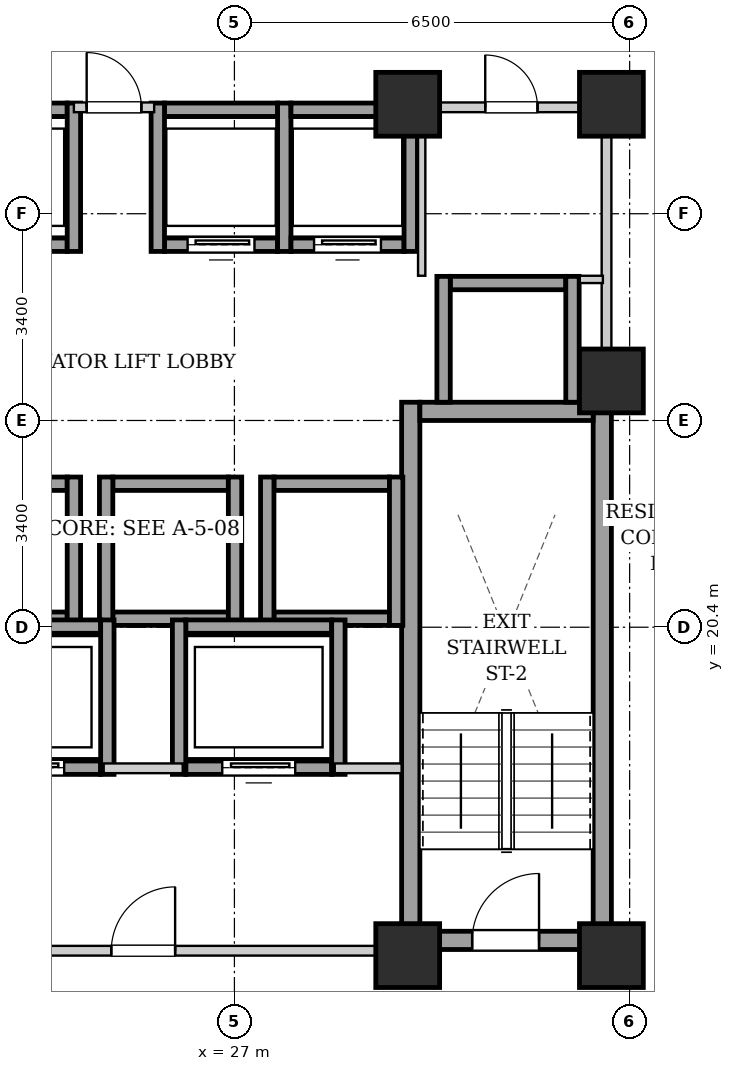
"""IFC4 building model, lengths in metres.
Left out: names, types, materials, properties, quantities, classifications, styles, units other than length and angle.
Written with IfcOpenShell. Run it as: python <this file> out.ifc"""

import sys

from ifc_helpers import new_model, si_unit, direction, frame, frame_2d, origin, origin_2d, place, context, subcontext, project, spatial, rectangle, extrude, element, fill, save


model = new_model("IFC4")
c1 = context("Model", 3, precision=1e-05, world=origin(), true_north=direction((0.0, 1.0)))
c2 = subcontext(c1, "Body", "Model", "MODEL_VIEW")
j1 = project(units=[si_unit("LENGTHUNIT", "METRE"), si_unit("PLANEANGLEUNIT", "RADIAN")], contexts=[c1])
p1 = place(None, origin())
s1 = spatial("IfcSite", under=j1, at=p1, CompositionType="ELEMENT")
p2 = place(p1, origin())
s2 = spatial("IfcBuilding", under=s1, at=p2, CompositionType="ELEMENT")
p3 = place(p2, frame((0.0, 0.0, 87.9)))
s3 = spatial("IfcBuildingStorey", under=s2, at=p3, CompositionType="ELEMENT", Elevation=87.9)
for number, where, z_axis, x_axis in (
    (1, (29.85, 15.0, 0.0), (0.0, 0.0, 1.0), (1.0, 0.0, 0.0)),
    (2, (33.2, 15.0, 0.0), (0.0, 0.0, 1.0), (1.0, 0.0, 0.0)),
    (3, (29.85, 29.0, 0.0), (0.0, 0.0, 1.0), (1.0, 0.0, 0.0)),
    (4, (33.2, 29.0, 0.0), (0.0, 0.0, 1.0), (1.0, 0.0, 0.0)),
    (5, (33.2, 24.45, 0.0), (0.0, 0.0, 1.0), (1.0, 0.0, 0.0)),
):
    element("IfcColumn", number, at=place(p3, frame(where, z_axis=z_axis, x_axis=x_axis)), inside=s3, PredefinedType="COLUMN", context=c2, shape_type="SweptSolid", body=[
        extrude(rectangle(XDim=1.05, YDim=1.05, at=origin_2d()), origin(), (0.0, 0.0, 1.0), 3.2),
    ])
for number, where, z_axis, x_axis in (
    (6, (29.9, 15.1, 0.0), (0.0, 0.0, 1.0), (0.0, 1.0, 0.0)),
    (7, (33.05, 15.1, 0.0), (0.0, 0.0, 1.0), (0.0, 1.0, 0.0)),
):
    element("IfcWall", number, at=place(p3, frame(where, z_axis=z_axis, x_axis=x_axis)), inside=s3, PredefinedType="SHEAR", context=c2, shape_type="SweptSolid", body=[
        extrude(rectangle(XDim=9.0, YDim=0.3, at=frame_2d((4.5, 0.0))), origin(), (0.0, 0.0, 1.0), 2.94),
    ])
p4 = place(p3, frame((30.05, 23.95, 0.0), z_axis=(0.0, 0.0, 1.0), x_axis=(1.0, 0.0, 0.0)))
e8 = element("IfcWall", 8, at=p4, inside=s3, PredefinedType="SHEAR", context=c2, shape_type="SweptSolid", body=[
    extrude(rectangle(XDim=2.85, YDim=0.3, at=frame_2d((1.425, 0.0))), origin(), (0.0, 0.0, 1.0), 2.94),
])
p5 = place(p3, frame((30.05, 15.25, 0.0), z_axis=(0.0, 0.0, 1.0), x_axis=(1.0, 0.0, 0.0)))
e9 = element("IfcWall", 9, at=p5, inside=s3, PredefinedType="SHEAR", context=c2, shape_type="SweptSolid", body=[
    extrude(rectangle(XDim=2.85, YDim=0.3, at=frame_2d((1.425, 0.0))), origin(), (0.0, 0.0, 1.0), 2.94),
])
p6 = place(p5, frame((0.86, 0.0, 0.0)))
e10 = element("IfcOpeningElement", 10, at=p6, cuts=e9, PredefinedType="OPENING", context=c2, shape_type="SweptSolid", body=[
    extrude(rectangle(XDim=1.1, YDim=2.05, at=frame_2d((0.55, 1.025))), frame((0.0, 0.16, 0.0), z_axis=(0.0, -1.0, 0.0), x_axis=(1.0, 0.0, 0.0)), (0.0, 0.0, 1.0), 0.32),
])
p7 = place(p3, frame((22.35, 26.69, 0.0), z_axis=(0.0, 0.0, 1.0), x_axis=(1.0, 0.0, 0.0)))
e11 = element("IfcWall", 11, at=p7, inside=s3, PredefinedType="SHEAR", context=c2, shape_type="SweptSolid", body=[
    extrude(rectangle(XDim=1.9, YDim=0.22, at=frame_2d((0.95, 0.0))), origin(), (0.0, 0.0, 1.0), 2.94),
])
p8 = place(p7, frame((0.4, 0.0, 0.0)))
e12 = element("IfcOpeningElement", 12, at=p8, cuts=e11, PredefinedType="OPENING", context=c2, shape_type="SweptSolid", body=[
    extrude(rectangle(XDim=1.1, YDim=2.15, at=frame_2d((0.55, 1.075))), frame((0.0, 0.12, 0.0), z_axis=(0.0, -1.0, 0.0), x_axis=(1.0, 0.0, 0.0)), (0.0, 0.0, 1.0), 0.24),
])
p9 = place(p3, frame((22.35, 28.91, 0.0), z_axis=(0.0, 0.0, 1.0), x_axis=(1.0, 0.0, 0.0)))
e13 = element("IfcWall", 13, at=p9, inside=s3, PredefinedType="SHEAR", context=c2, shape_type="SweptSolid", body=[
    extrude(rectangle(XDim=1.9, YDim=0.22, at=frame_2d((0.95, 0.0))), origin(), (0.0, 0.0, 1.0), 2.94),
])
p10 = place(p3, frame((24.36, 26.58, 0.0), z_axis=(0.0, 0.0, 1.0), x_axis=(0.0, 1.0, 0.0)))
e14 = element("IfcWall", 14, at=p10, inside=s3, PredefinedType="SHEAR", context=c2, shape_type="SweptSolid", body=[
    extrude(rectangle(XDim=2.44, YDim=0.22, at=frame_2d((1.22, 0.0))), origin(), (0.0, 0.0, 1.0), 2.94),
])
p11 = place(p3, frame((25.85, 26.69, 0.0), z_axis=(0.0, 0.0, 1.0), x_axis=(1.0, 0.0, 0.0)))
e15 = element("IfcWall", 15, at=p11, inside=s3, PredefinedType="SHEAR", context=c2, shape_type="SweptSolid", body=[
    extrude(rectangle(XDim=1.86, YDim=0.22, at=frame_2d((0.93, 0.0))), origin(), (0.0, 0.0, 1.0), 2.94),
])
p12 = place(p11, frame((0.38, 0.0, 0.0)))
e16 = element("IfcOpeningElement", 16, at=p12, cuts=e15, PredefinedType="OPENING", context=c2, shape_type="SweptSolid", body=[
    extrude(rectangle(XDim=1.1, YDim=2.15, at=frame_2d((0.55, 1.075))), frame((0.0, 0.12, 0.0), z_axis=(0.0, -1.0, 0.0), x_axis=(1.0, 0.0, 0.0)), (0.0, 0.0, 1.0), 0.24),
])
p13 = place(p3, frame((25.85, 28.91, 0.0), z_axis=(0.0, 0.0, 1.0), x_axis=(1.0, 0.0, 0.0)))
e17 = element("IfcWall", 17, at=p13, inside=s3, PredefinedType="SHEAR", context=c2, shape_type="SweptSolid", body=[
    extrude(rectangle(XDim=1.86, YDim=0.22, at=frame_2d((0.93, 0.0))), origin(), (0.0, 0.0, 1.0), 2.94),
])
for number, where, z_axis, x_axis in (
    (18, (25.74, 26.58, 0.0), (0.0, 0.0, 1.0), (0.0, 1.0, 0.0)),
    (19, (27.82, 26.58, 0.0), (0.0, 0.0, 1.0), (0.0, 1.0, 0.0)),
):
    element("IfcWall", number, at=place(p3, frame(where, z_axis=z_axis, x_axis=x_axis)), inside=s3, PredefinedType="SHEAR", context=c2, shape_type="SweptSolid", body=[
        extrude(rectangle(XDim=2.44, YDim=0.22, at=frame_2d((1.22, 0.0))), origin(), (0.0, 0.0, 1.0), 2.94),
    ])
p14 = place(p3, frame((27.93, 26.69, 0.0), z_axis=(0.0, 0.0, 1.0), x_axis=(1.0, 0.0, 0.0)))
e20 = element("IfcWall", 20, at=p14, inside=s3, PredefinedType="SHEAR", context=c2, shape_type="SweptSolid", body=[
    extrude(rectangle(XDim=1.86, YDim=0.22, at=frame_2d((0.93, 0.0))), origin(), (0.0, 0.0, 1.0), 2.94),
])
p15 = place(p14, frame((0.38, 0.0, 0.0)))
e21 = element("IfcOpeningElement", 21, at=p15, cuts=e20, PredefinedType="OPENING", context=c2, shape_type="SweptSolid", body=[
    extrude(rectangle(XDim=1.1, YDim=2.15, at=frame_2d((0.55, 1.075))), frame((0.0, 0.12, 0.0), z_axis=(0.0, -1.0, 0.0), x_axis=(1.0, 0.0, 0.0)), (0.0, 0.0, 1.0), 0.24),
])
p16 = place(p3, frame((27.93, 28.91, 0.0), z_axis=(0.0, 0.0, 1.0), x_axis=(1.0, 0.0, 0.0)))
e22 = element("IfcWall", 22, at=p16, inside=s3, PredefinedType="SHEAR", context=c2, shape_type="SweptSolid", body=[
    extrude(rectangle(XDim=1.86, YDim=0.22, at=frame_2d((0.93, 0.0))), origin(), (0.0, 0.0, 1.0), 2.94),
])
p17 = place(p3, frame((29.9, 26.58, 0.0), z_axis=(0.0, 0.0, 1.0), x_axis=(0.0, 1.0, 0.0)))
e23 = element("IfcWall", 23, at=p17, inside=s3, PredefinedType="SHEAR", context=c2, shape_type="SweptSolid", body=[
    extrude(rectangle(XDim=2.44, YDim=0.22, at=frame_2d((1.22, 0.0))), origin(), (0.0, 0.0, 1.0), 2.94),
])
for number, where, z_axis, x_axis in (
    (24, (22.35, 20.54, 0.0), (0.0, 0.0, 1.0), (1.0, 0.0, 0.0)),
    (25, (22.35, 22.76, 0.0), (0.0, 0.0, 1.0), (1.0, 0.0, 0.0)),
):
    element("IfcWall", number, at=place(p3, frame(where, z_axis=z_axis, x_axis=x_axis)), inside=s3, PredefinedType="SHEAR", context=c2, shape_type="SweptSolid", body=[
        extrude(rectangle(XDim=1.9, YDim=0.22, at=frame_2d((0.95, 0.0))), origin(), (0.0, 0.0, 1.0), 2.94),
    ])
p18 = place(p3, frame((24.36, 20.43, 0.0), z_axis=(0.0, 0.0, 1.0), x_axis=(0.0, 1.0, 0.0)))
e26 = element("IfcWall", 26, at=p18, inside=s3, PredefinedType="SHEAR", context=c2, shape_type="SweptSolid", body=[
    extrude(rectangle(XDim=2.44, YDim=0.22, at=frame_2d((1.22, 0.0))), origin(), (0.0, 0.0, 1.0), 2.94),
])
for number, where, z_axis, x_axis in (
    (27, (25.0, 20.54, 0.0), (0.0, 0.0, 1.0), (1.0, 0.0, 0.0)),
    (28, (25.0, 22.76, 0.0), (0.0, 0.0, 1.0), (1.0, 0.0, 0.0)),
):
    element("IfcWall", number, at=place(p3, frame(where, z_axis=z_axis, x_axis=x_axis)), inside=s3, PredefinedType="SHEAR", context=c2, shape_type="SweptSolid", body=[
        extrude(rectangle(XDim=1.9, YDim=0.22, at=frame_2d((0.95, 0.0))), origin(), (0.0, 0.0, 1.0), 2.94),
    ])
for number, where, z_axis, x_axis in (
    (29, (24.89, 20.43, 0.0), (0.0, 0.0, 1.0), (0.0, 1.0, 0.0)),
    (30, (27.01, 20.43, 0.0), (0.0, 0.0, 1.0), (0.0, 1.0, 0.0)),
):
    element("IfcWall", number, at=place(p3, frame(where, z_axis=z_axis, x_axis=x_axis)), inside=s3, PredefinedType="SHEAR", context=c2, shape_type="SweptSolid", body=[
        extrude(rectangle(XDim=2.44, YDim=0.22, at=frame_2d((1.22, 0.0))), origin(), (0.0, 0.0, 1.0), 2.94),
    ])
for number, where, z_axis, x_axis in (
    (31, (27.65, 20.54, 0.0), (0.0, 0.0, 1.0), (1.0, 0.0, 0.0)),
    (32, (27.65, 22.76, 0.0), (0.0, 0.0, 1.0), (1.0, 0.0, 0.0)),
):
    element("IfcWall", number, at=place(p3, frame(where, z_axis=z_axis, x_axis=x_axis)), inside=s3, PredefinedType="SHEAR", context=c2, shape_type="SweptSolid", body=[
        extrude(rectangle(XDim=1.9, YDim=0.22, at=frame_2d((0.95, 0.0))), origin(), (0.0, 0.0, 1.0), 2.94),
    ])
for number, where, z_axis, x_axis in (
    (33, (27.54, 20.43, 0.0), (0.0, 0.0, 1.0), (0.0, 1.0, 0.0)),
    (34, (29.66, 20.43, 0.0), (0.0, 0.0, 1.0), (0.0, 1.0, 0.0)),
):
    element("IfcWall", number, at=place(p3, frame(where, z_axis=z_axis, x_axis=x_axis)), inside=s3, PredefinedType="SHEAR", context=c2, shape_type="SweptSolid", body=[
        extrude(rectangle(XDim=2.44, YDim=0.22, at=frame_2d((1.22, 0.0))), origin(), (0.0, 0.0, 1.0), 2.94),
    ])
p19 = place(p3, frame((30.55, 26.06, 0.0), z_axis=(0.0, 0.0, 1.0), x_axis=(1.0, 0.0, 0.0)))
e35 = element("IfcWall", 35, at=p19, inside=s3, PredefinedType="SHEAR", context=c2, shape_type="SweptSolid", body=[
    extrude(rectangle(XDim=1.9, YDim=0.22, at=frame_2d((0.95, 0.0))), origin(), (0.0, 0.0, 1.0), 2.94),
])
for number, where, z_axis, x_axis in (
    (36, (30.44, 24.1, 0.0), (0.0, 0.0, 1.0), (0.0, 1.0, 0.0)),
    (37, (32.56, 24.1, 0.0), (0.0, 0.0, 1.0), (0.0, 1.0, 0.0)),
):
    element("IfcWall", number, at=place(p3, frame(where, z_axis=z_axis, x_axis=x_axis)), inside=s3, PredefinedType="SHEAR", context=c2, shape_type="SweptSolid", body=[
        extrude(rectangle(XDim=2.07, YDim=0.22, at=frame_2d((1.035, 0.0))), origin(), (0.0, 0.0, 1.0), 2.94),
    ])
p20 = place(p3, frame((22.4, 18.09, 0.0), z_axis=(0.0, 0.0, 1.0), x_axis=(1.0, 0.0, 0.0)))
e38 = element("IfcWall", 38, at=p20, inside=s3, PredefinedType="SHEAR", context=c2, shape_type="SweptSolid", body=[
    extrude(rectangle(XDim=2.4, YDim=0.22, at=frame_2d((1.2, 0.0))), origin(), (0.0, 0.0, 1.0), 2.94),
])
p21 = place(p20, frame((0.6, 0.0, 0.0)))
e39 = element("IfcOpeningElement", 39, at=p21, cuts=e38, PredefinedType="OPENING", context=c2, shape_type="SweptSolid", body=[
    extrude(rectangle(XDim=1.2, YDim=2.15, at=frame_2d((0.6, 1.075))), frame((0.0, 0.12, 0.0), z_axis=(0.0, -1.0, 0.0), x_axis=(1.0, 0.0, 0.0)), (0.0, 0.0, 1.0), 0.24),
])
p22 = place(p3, frame((22.4, 20.41, 0.0), z_axis=(0.0, 0.0, 1.0), x_axis=(1.0, 0.0, 0.0)))
e40 = element("IfcWall", 40, at=p22, inside=s3, PredefinedType="SHEAR", context=c2, shape_type="SweptSolid", body=[
    extrude(rectangle(XDim=2.4, YDim=0.22, at=frame_2d((1.2, 0.0))), origin(), (0.0, 0.0, 1.0), 2.94),
])
p23 = place(p3, frame((24.91, 17.98, 0.0), z_axis=(0.0, 0.0, 1.0), x_axis=(0.0, 1.0, 0.0)))
e41 = element("IfcWall", 41, at=p23, inside=s3, PredefinedType="SHEAR", context=c2, shape_type="SweptSolid", body=[
    extrude(rectangle(XDim=2.54, YDim=0.22, at=frame_2d((1.27, 0.0))), origin(), (0.0, 0.0, 1.0), 2.94),
])
p24 = place(p3, frame((26.2, 18.09, 0.0), z_axis=(0.0, 0.0, 1.0), x_axis=(1.0, 0.0, 0.0)))
e42 = element("IfcWall", 42, at=p24, inside=s3, PredefinedType="SHEAR", context=c2, shape_type="SweptSolid", body=[
    extrude(rectangle(XDim=2.4, YDim=0.22, at=frame_2d((1.2, 0.0))), origin(), (0.0, 0.0, 1.0), 2.94),
])
p25 = place(p24, frame((0.6, 0.0, 0.0)))
e43 = element("IfcOpeningElement", 43, at=p25, cuts=e42, PredefinedType="OPENING", context=c2, shape_type="SweptSolid", body=[
    extrude(rectangle(XDim=1.2, YDim=2.15, at=frame_2d((0.6, 1.075))), frame((0.0, 0.12, 0.0), z_axis=(0.0, -1.0, 0.0), x_axis=(1.0, 0.0, 0.0)), (0.0, 0.0, 1.0), 0.24),
])
p26 = place(p3, frame((26.2, 20.41, 0.0), z_axis=(0.0, 0.0, 1.0), x_axis=(1.0, 0.0, 0.0)))
e44 = element("IfcWall", 44, at=p26, inside=s3, PredefinedType="SHEAR", context=c2, shape_type="SweptSolid", body=[
    extrude(rectangle(XDim=2.4, YDim=0.22, at=frame_2d((1.2, 0.0))), origin(), (0.0, 0.0, 1.0), 2.94),
])
for number, where, z_axis, x_axis in (
    (45, (26.09, 17.98, 0.0), (0.0, 0.0, 1.0), (0.0, 1.0, 0.0)),
    (46, (28.71, 17.98, 0.0), (0.0, 0.0, 1.0), (0.0, 1.0, 0.0)),
):
    element("IfcWall", number, at=place(p3, frame(where, z_axis=z_axis, x_axis=x_axis)), inside=s3, PredefinedType="SHEAR", context=c2, shape_type="SweptSolid", body=[
        extrude(rectangle(XDim=2.54, YDim=0.22, at=frame_2d((1.27, 0.0))), origin(), (0.0, 0.0, 1.0), 2.94),
    ])
p27 = place(p3, frame((21.25, 15.08, 0.0), z_axis=(0.0, 0.0, 1.0), x_axis=(1.0, 0.0, 0.0)))
e47 = element("IfcWall", 47, at=p27, inside=s3, PredefinedType="PARTITIONING", context=c2, shape_type="SweptSolid", body=[
    extrude(rectangle(XDim=8.5, YDim=0.16, at=frame_2d((4.25, 0.0))), origin(), (0.0, 0.0, 1.0), 2.309),
])
p28 = place(p27, frame((3.725, 0.0, 0.0)))
e48 = element("IfcOpeningElement", 48, at=p28, cuts=e47, PredefinedType="OPENING", context=c2, shape_type="SweptSolid", body=[
    extrude(rectangle(XDim=1.05, YDim=2.05, at=frame_2d((0.525, 1.025))), frame((0.0, 0.09, 0.0), z_axis=(0.0, -1.0, 0.0), x_axis=(1.0, 0.0, 0.0)), (0.0, 0.0, 1.0), 0.18),
])
p29 = place(p3, frame((24.85, 18.08, 0.0), z_axis=(0.0, 0.0, 1.0), x_axis=(1.0, 0.0, 0.0)))
e49 = element("IfcWall", 49, at=p29, inside=s3, PredefinedType="PARTITIONING", context=c2, shape_type="SweptSolid", body=[
    extrude(rectangle(XDim=1.3, YDim=0.16, at=frame_2d((0.65, 0.0))), origin(), (0.0, 0.0, 1.0), 2.94),
])
p30 = place(p3, frame((28.65, 18.08, 0.0), z_axis=(0.0, 0.0, 1.0), x_axis=(1.0, 0.0, 0.0)))
e50 = element("IfcWall", 50, at=p30, inside=s3, PredefinedType="PARTITIONING", context=c2, shape_type="SweptSolid", body=[
    extrude(rectangle(XDim=1.1, YDim=0.16, at=frame_2d((0.55, 0.0))), origin(), (0.0, 0.0, 1.0), 2.94),
])
p31 = place(p3, frame((33.12, 24.12, 0.0), z_axis=(0.0, 0.0, 1.0), x_axis=(0.0, 1.0, 0.0)))
e51 = element("IfcWall", 51, at=p31, inside=s3, PredefinedType="PARTITIONING", context=c2, shape_type="SweptSolid", body=[
    extrude(rectangle(XDim=4.76, YDim=0.16, at=frame_2d((2.38, 0.0))), origin(), (0.0, 0.0, 1.0), 2.275),
])
p32 = place(p3, frame((24.36, 28.95, 0.0), z_axis=(0.0, 0.0, 1.0), x_axis=(1.0, 0.0, 0.0)))
e52 = element("IfcWall", 52, at=p32, inside=s3, PredefinedType="PARTITIONING", context=c2, shape_type="SweptSolid", body=[
    extrude(rectangle(XDim=1.32, YDim=0.16, at=frame_2d((0.66, 0.0))), origin(), (0.0, 0.0, 1.0), 2.309),
])
p33 = place(p32, frame((0.21, 0.0, 0.0)))
e53 = element("IfcOpeningElement", 53, at=p33, cuts=e52, PredefinedType="OPENING", context=c2, shape_type="SweptSolid", body=[
    extrude(rectangle(XDim=0.9, YDim=2.05, at=frame_2d((0.45, 1.025))), frame((0.0, 0.09, 0.0), z_axis=(0.0, -1.0, 0.0), x_axis=(1.0, 0.0, 0.0)), (0.0, 0.0, 1.0), 0.18),
])
p34 = place(p3, frame((30.08, 26.18, 0.0), z_axis=(0.0, 0.0, 1.0), x_axis=(0.0, 1.0, 0.0)))
e54 = element("IfcWall", 54, at=p34, inside=s3, PredefinedType="PARTITIONING", context=c2, shape_type="SweptSolid", body=[
    extrude(rectangle(XDim=2.68, YDim=0.12, at=frame_2d((1.34, 0.0))), origin(), (0.0, 0.0, 1.0), 2.94),
])
p35 = place(p3, frame((32.68, 26.12, 0.0), z_axis=(0.0, 0.0, 1.0), x_axis=(1.0, 0.0, 0.0)))
e55 = element("IfcWall", 55, at=p35, inside=s3, PredefinedType="PARTITIONING", context=c2, shape_type="SweptSolid", body=[
    extrude(rectangle(XDim=0.38, YDim=0.12, at=frame_2d((0.19, 0.0))), origin(), (0.0, 0.0, 1.0), 2.94),
])
p36 = place(p3, frame((30.08, 28.95, 0.0), z_axis=(0.0, 0.0, 1.0), x_axis=(1.0, 0.0, 0.0)))
e56 = element("IfcWall", 56, at=p36, inside=s3, PredefinedType="PARTITIONING", context=c2, shape_type="SweptSolid", body=[
    extrude(rectangle(XDim=2.96, YDim=0.16, at=frame_2d((1.48, 0.0))), origin(), (0.0, 0.0, 1.0), 2.94),
])
p37 = place(p36, frame((1.045, 0.0, 0.0)))
e57 = element("IfcOpeningElement", 57, at=p37, cuts=e56, PredefinedType="OPENING", context=c2, shape_type="SweptSolid", body=[
    extrude(rectangle(XDim=0.86, YDim=2.05, at=frame_2d((0.43, 1.025))), frame((0.0, 0.09, 0.0), z_axis=(0.0, -1.0, 0.0), x_axis=(1.0, 0.0, 0.0)), (0.0, 0.0, 1.0), 0.18),
])
p38 = place(p6, origin())
e58 = element("IfcDoor", 58, at=p38, inside=s3, OperationType="SINGLE_SWING_RIGHT", PredefinedType="DOOR", context=c2, shape_type="SweptSolid", body=[
    extrude(rectangle(XDim=1.1, YDim=2.05, at=frame_2d((0.55, 1.025))), frame((0.0, 0.025, 0.0), z_axis=(0.0, -1.0, 0.0), x_axis=(1.0, 0.0, 0.0)), (0.0, 0.0, 1.0), 0.05),
])
fill(e10, e58)
p39 = place(p12, origin())
e59 = element("IfcDoor", 59, at=p39, inside=s3, OperationType="SLIDING_TO_LEFT", PredefinedType="DOOR", context=c2, shape_type="SweptSolid", body=[
    extrude(rectangle(XDim=1.1, YDim=2.15, at=frame_2d((0.55, 1.075))), frame((0.0, 0.025, 0.0), z_axis=(0.0, -1.0, 0.0), x_axis=(1.0, 0.0, 0.0)), (0.0, 0.0, 1.0), 0.05),
])
fill(e16, e59)
p40 = place(p15, origin())
e60 = element("IfcDoor", 60, at=p40, inside=s3, OperationType="SLIDING_TO_LEFT", PredefinedType="DOOR", context=c2, shape_type="SweptSolid", body=[
    extrude(rectangle(XDim=1.1, YDim=2.15, at=frame_2d((0.55, 1.075))), frame((0.0, 0.025, 0.0), z_axis=(0.0, -1.0, 0.0), x_axis=(1.0, 0.0, 0.0)), (0.0, 0.0, 1.0), 0.05),
])
fill(e21, e60)
p41 = place(p21, origin())
e61 = element("IfcDoor", 61, at=p41, inside=s3, OperationType="SLIDING_TO_LEFT", PredefinedType="DOOR", context=c2, shape_type="SweptSolid", body=[
    extrude(rectangle(XDim=1.2, YDim=2.15, at=frame_2d((0.6, 1.075))), frame((0.0, 0.025, 0.0), z_axis=(0.0, -1.0, 0.0), x_axis=(1.0, 0.0, 0.0)), (0.0, 0.0, 1.0), 0.05),
])
fill(e39, e61)
p42 = place(p25, origin())
e62 = element("IfcDoor", 62, at=p42, inside=s3, OperationType="SLIDING_TO_LEFT", PredefinedType="DOOR", context=c2, shape_type="SweptSolid", body=[
    extrude(rectangle(XDim=1.2, YDim=2.15, at=frame_2d((0.6, 1.075))), frame((0.0, 0.025, 0.0), z_axis=(0.0, -1.0, 0.0), x_axis=(1.0, 0.0, 0.0)), (0.0, 0.0, 1.0), 0.05),
])
fill(e43, e62)
p43 = place(p28, origin())
e63 = element("IfcDoor", 63, at=p43, inside=s3, OperationType="SINGLE_SWING_RIGHT", PredefinedType="DOOR", context=c2, shape_type="SweptSolid", body=[
    extrude(rectangle(XDim=1.05, YDim=2.05, at=frame_2d((0.525, 1.025))), frame((0.0, 0.025, 0.0), z_axis=(0.0, -1.0, 0.0), x_axis=(1.0, 0.0, 0.0)), (0.0, 0.0, 1.0), 0.05),
])
fill(e48, e63)
p44 = place(p33, origin())
e64 = element("IfcDoor", 64, at=p44, inside=s3, OperationType="SINGLE_SWING_LEFT", PredefinedType="DOOR", context=c2, shape_type="SweptSolid", body=[
    extrude(rectangle(XDim=0.9, YDim=2.05, at=frame_2d((0.45, 1.025))), frame((0.0, 0.025, 0.0), z_axis=(0.0, -1.0, 0.0), x_axis=(1.0, 0.0, 0.0)), (0.0, 0.0, 1.0), 0.05),
])
fill(e53, e64)
p45 = place(p37, origin())
e65 = element("IfcDoor", 65, at=p45, inside=s3, OperationType="SINGLE_SWING_LEFT", PredefinedType="DOOR", context=c2, shape_type="SweptSolid", body=[
    extrude(rectangle(XDim=0.86, YDim=2.05, at=frame_2d((0.43, 1.025))), frame((0.0, 0.025, 0.0), z_axis=(0.0, -1.0, 0.0), x_axis=(1.0, 0.0, 0.0)), (0.0, 0.0, 1.0), 0.05),
])
fill(e57, e65)
save(model, sys.argv[1])
